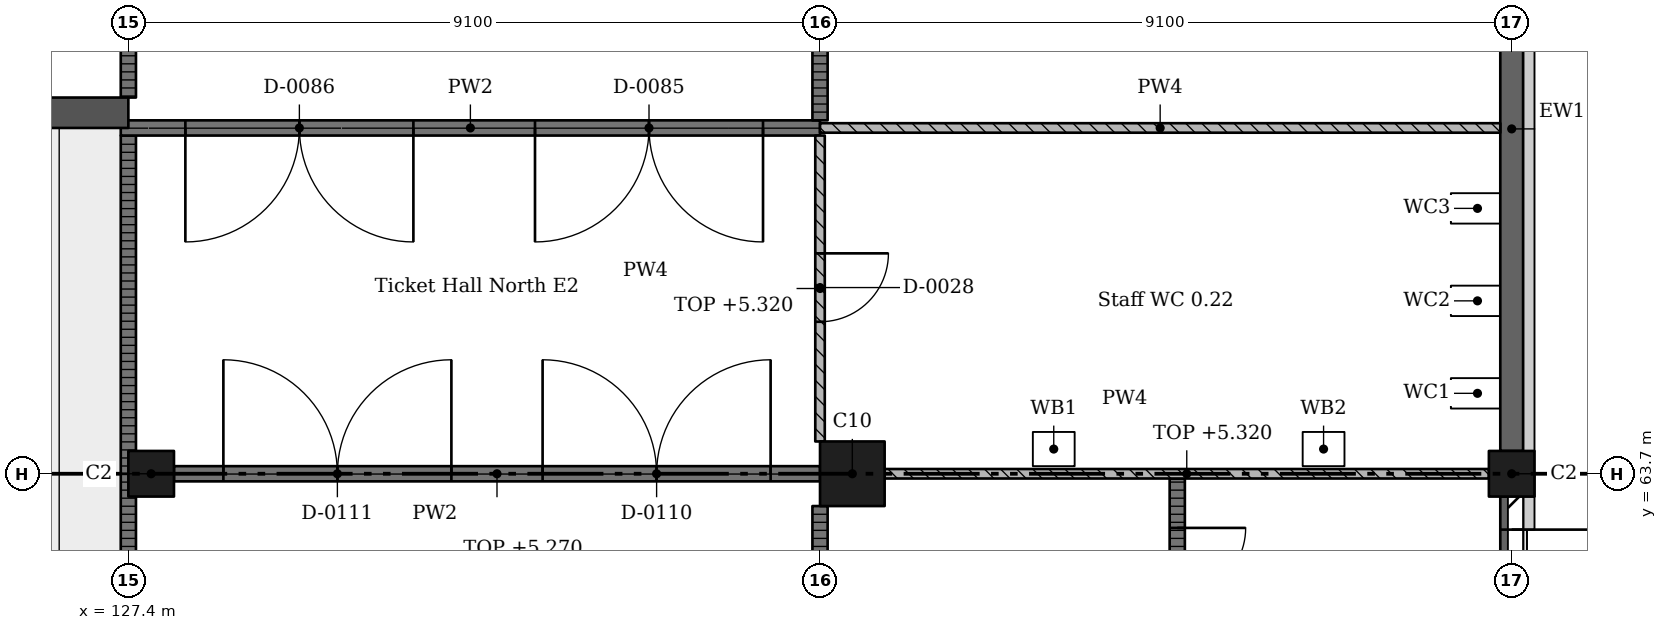
"""IFC4 building model, lengths in metres.
Left out: names, types, materials, properties, quantities, classifications, styles, units other than length and angle.
Written with IfcOpenShell. Run it as: python <this file> out.ifc"""

import sys

from ifc_helpers import new_model, si_unit, direction, frame, frame_2d, origin, origin_2d, place, context, subcontext, project, spatial, rectangle, extrude, element, fill, save


model = new_model("IFC4")
c1 = context("Model", 3, precision=1e-05, world=origin(), true_north=direction((0.0, 1.0)))
c2 = subcontext(c1, "Body", "Model", "MODEL_VIEW")
j1 = project(units=[si_unit("LENGTHUNIT", "METRE"), si_unit("PLANEANGLEUNIT", "RADIAN")], contexts=[c1])
p1 = place(None, origin())
s1 = spatial("IfcSite", under=j1, at=p1, CompositionType="ELEMENT")
p2 = place(p1, origin())
s2 = spatial("IfcBuilding", under=s1, at=p2, CompositionType="ELEMENT")
p3 = place(p2, origin())
s3 = spatial("IfcBuildingStorey", under=s2, at=p3, CompositionType="ELEMENT", Elevation=0.0)
p4 = place(p3, frame((127.7, 63.7, -0.4), z_axis=(0.0, 0.0, 1.0), x_axis=(1.0, 0.0, 0.0)))
e1 = element("IfcColumn", 1, at=p4, inside=s3, PredefinedType="COLUMN", context=c2, shape_type="SweptSolid", body=[
    extrude(rectangle(XDim=0.6, YDim=0.6, at=origin_2d()), origin(), (0.0, 0.0, 1.0), 6.77),
])
p5 = place(p3, frame((136.925, 63.7, -0.4), z_axis=(0.0, 0.0, 1.0), x_axis=(1.0, 0.0, 0.0)))
e2 = element("IfcColumn", 2, at=p5, inside=s3, PredefinedType="COLUMN", context=c2, shape_type="SweptSolid", body=[
    extrude(rectangle(XDim=0.85, YDim=0.85, at=origin_2d()), origin(), (0.0, 0.0, 1.0), 6.77),
])
p6 = place(p3, frame((145.6, 63.7, -0.4), z_axis=(0.0, 0.0, 1.0), x_axis=(1.0, 0.0, 0.0)))
e3 = element("IfcColumn", 3, at=p6, inside=s3, PredefinedType="COLUMN", context=c2, shape_type="SweptSolid", body=[
    extrude(rectangle(XDim=0.6, YDim=0.6, at=origin_2d()), origin(), (0.0, 0.0, 1.0), 6.77),
])
p7 = place(p3, frame((109.2, 68.45, -0.4), z_axis=(0.0, 0.0, 1.0), x_axis=(1.0, 0.0, 0.0)))
e4 = element("IfcWall", 4, at=p7, inside=s3, PredefinedType="SHEAR", context=c2, shape_type="SweptSolid", body=[
    extrude(rectangle(XDim=18.2, YDim=0.4, at=frame_2d((9.1, 0.0))), origin(), (0.0, 0.0, 1.0), 6.77),
])
p8 = place(p3, frame((145.6, 54.9, 0.0), z_axis=(0.0, 0.0, 1.0), x_axis=(0.0, 1.0, 0.0)))
e5 = element("IfcWall", 5, at=p8, inside=s3, PredefinedType="SOLIDWALL", context=c2, shape_type="SweptSolid", body=[
    extrude(rectangle(XDim=8.5, YDim=0.3, at=frame_2d((4.25, 0.0))), origin(), (0.0, 0.0, 1.0), 3.75),
])
p9 = place(p8, frame((0.435, 0.0, 0.0)))
e6 = element("IfcOpeningElement", 6, at=p9, cuts=e5, PredefinedType="OPENING", context=c2, shape_type="SweptSolid", body=[
    extrude(rectangle(XDim=3.6, YDim=2.7, at=frame_2d((1.8, 1.35))), frame((0.0, 0.16, 0.0), z_axis=(0.0, -1.0, 0.0), x_axis=(1.0, 0.0, 0.0)), (0.0, 0.0, 1.0), 0.32),
])
p10 = place(p8, frame((4.465, 0.0, 0.0)))
e7 = element("IfcOpeningElement", 7, at=p10, cuts=e5, PredefinedType="OPENING", context=c2, shape_type="SweptSolid", body=[
    extrude(rectangle(XDim=3.6, YDim=2.7, at=frame_2d((1.8, 1.35))), frame((0.0, 0.16, 0.0), z_axis=(0.0, -1.0, 0.0), x_axis=(1.0, 0.0, 0.0)), (0.0, 0.0, 1.0), 0.32),
])
p11 = place(p3, frame((145.6, 64.0, 0.0), z_axis=(0.0, 0.0, 1.0), x_axis=(0.0, 1.0, 0.0)))
e8 = element("IfcWall", 8, at=p11, inside=s3, PredefinedType="SOLIDWALL", context=c2, shape_type="SweptSolid", body=[
    extrude(rectangle(XDim=8.475, YDim=0.3, at=frame_2d((4.238, 0.0))), origin(), (0.0, 0.0, 1.0), 5.27),
])
p12 = place(p3, frame((127.4, 54.9, 0.0), z_axis=(0.0, 0.0, 1.0), x_axis=(0.0, 1.0, 0.0)))
e9 = element("IfcWall", 9, at=p12, inside=s3, PredefinedType="PARTITIONING", context=c2, shape_type="SweptSolid", body=[
    extrude(rectangle(XDim=8.8, YDim=0.2, at=frame_2d((4.4, 0.0))), origin(), (0.0, 0.0, 1.0), 5.02),
])
p13 = place(p3, frame((127.4, 63.7, 0.0), z_axis=(0.0, 0.0, 1.0), x_axis=(0.0, 1.0, 0.0)))
e10 = element("IfcWall", 10, at=p13, inside=s3, PredefinedType="PARTITIONING", context=c2, shape_type="SweptSolid", body=[
    extrude(rectangle(XDim=4.45, YDim=0.2, at=frame_2d((2.225, 0.0))), origin(), (0.0, 0.0, 1.0), 5.02),
])
p14 = place(p3, frame((127.4, 72.325, 0.0), z_axis=(0.0, 0.0, 1.0), x_axis=(0.0, -1.0, 0.0)))
e11 = element("IfcWall", 11, at=p14, inside=s3, PredefinedType="PARTITIONING", context=c2, shape_type="SweptSolid", body=[
    extrude(rectangle(XDim=3.675, YDim=0.2, at=frame_2d((1.837, 0.0))), origin(), (0.0, 0.0, 1.0), 5.02),
])
p15 = place(p3, frame((136.5, 63.275, 0.0), z_axis=(0.0, 0.0, 1.0), x_axis=(0.0, -1.0, 0.0)))
e12 = element("IfcWall", 12, at=p15, inside=s3, PredefinedType="PARTITIONING", context=c2, shape_type="SweptSolid", body=[
    extrude(rectangle(XDim=8.25, YDim=0.2, at=frame_2d((4.125, 0.0))), origin(), (0.0, 0.0, 1.0), 5.32),
])
p16 = place(p15, frame((1.15, 0.0, 0.0)))
e13 = element("IfcOpeningElement", 13, at=p16, cuts=e12, PredefinedType="OPENING", context=c2, shape_type="SweptSolid", body=[
    extrude(rectangle(XDim=1.8, YDim=2.4, at=frame_2d((0.9, 1.2))), frame((0.0, 0.11, 0.0), z_axis=(0.0, -1.0, 0.0), x_axis=(1.0, 0.0, 0.0)), (0.0, 0.0, 1.0), 0.22),
])
p17 = place(p15, frame((5.25, 0.0, 0.0)))
e14 = element("IfcOpeningElement", 14, at=p17, cuts=e12, PredefinedType="OPENING", context=c2, shape_type="SweptSolid", body=[
    extrude(rectangle(XDim=1.8, YDim=2.4, at=frame_2d((0.9, 1.2))), frame((0.0, 0.11, 0.0), z_axis=(0.0, -1.0, 0.0), x_axis=(1.0, 0.0, 0.0)), (0.0, 0.0, 1.0), 0.22),
])
p18 = place(p3, frame((136.5, 63.7, 0.0), z_axis=(0.0, 0.0, 1.0), x_axis=(-1.0, 0.0, 0.0)))
e15 = element("IfcWall", 15, at=p18, inside=s3, PredefinedType="PARTITIONING", context=c2, shape_type="SweptSolid", body=[
    extrude(rectangle(XDim=8.5, YDim=0.2, at=frame_2d((4.25, 0.0))), origin(), (0.0, 0.0, 1.0), 5.27),
])
p19 = place(p18, frame((0.65, 0.0, 0.0)))
e16 = element("IfcOpeningElement", 16, at=p19, cuts=e15, PredefinedType="OPENING", context=c2, shape_type="SweptSolid", body=[
    extrude(rectangle(XDim=3.0, YDim=2.4, at=frame_2d((1.5, 1.2))), frame((0.0, 0.11, 0.0), z_axis=(0.0, -1.0, 0.0), x_axis=(1.0, 0.0, 0.0)), (0.0, 0.0, 1.0), 0.22),
])
p20 = place(p18, frame((4.85, 0.0, 0.0)))
e17 = element("IfcOpeningElement", 17, at=p20, cuts=e15, PredefinedType="OPENING", context=c2, shape_type="SweptSolid", body=[
    extrude(rectangle(XDim=3.0, YDim=2.4, at=frame_2d((1.5, 1.2))), frame((0.0, 0.11, 0.0), z_axis=(0.0, -1.0, 0.0), x_axis=(1.0, 0.0, 0.0)), (0.0, 0.0, 1.0), 0.22),
])
p21 = place(p3, frame((136.5, 68.15, 0.0), z_axis=(0.0, 0.0, 1.0), x_axis=(0.0, -1.0, 0.0)))
e18 = element("IfcWall", 18, at=p21, inside=s3, PredefinedType="PARTITIONING", context=c2, shape_type="SweptSolid", body=[
    extrude(rectangle(XDim=4.025, YDim=0.125, at=frame_2d((2.012, 0.0))), origin(), (0.0, 0.0, 1.0), 5.32),
])
p22 = place(p21, frame((1.55, 0.0, 0.0)))
e19 = element("IfcOpeningElement", 19, at=p22, cuts=e18, PredefinedType="OPENING", context=c2, shape_type="SweptSolid", body=[
    extrude(rectangle(XDim=0.9, YDim=2.1, at=frame_2d((0.45, 1.05))), frame((0.0, 0.073, 0.0), z_axis=(0.0, -1.0, 0.0), x_axis=(1.0, 0.0, 0.0)), (0.0, 0.0, 1.0), 0.145),
])
p23 = place(p3, frame((136.5, 68.25, 0.0), z_axis=(0.0, 0.0, 1.0), x_axis=(-1.0, 0.0, 0.0)))
e20 = element("IfcWall", 20, at=p23, inside=s3, PredefinedType="PARTITIONING", context=c2, shape_type="SweptSolid", body=[
    extrude(rectangle(XDim=9.2, YDim=0.2, at=frame_2d((4.6, 0.0))), origin(), (0.0, 0.0, 1.0), 6.02),
])
p24 = place(p23, frame((0.75, 0.0, 0.0)))
e21 = element("IfcOpeningElement", 21, at=p24, cuts=e20, PredefinedType="OPENING", context=c2, shape_type="SweptSolid", body=[
    extrude(rectangle(XDim=3.0, YDim=2.4, at=frame_2d((1.5, 1.2))), frame((0.0, 0.11, 0.0), z_axis=(0.0, -1.0, 0.0), x_axis=(1.0, 0.0, 0.0)), (0.0, 0.0, 1.0), 0.22),
])
p25 = place(p23, frame((5.35, 0.0, 0.0)))
e22 = element("IfcOpeningElement", 22, at=p25, cuts=e20, PredefinedType="OPENING", context=c2, shape_type="SweptSolid", body=[
    extrude(rectangle(XDim=3.0, YDim=2.4, at=frame_2d((1.5, 1.2))), frame((0.0, 0.11, 0.0), z_axis=(0.0, -1.0, 0.0), x_axis=(1.0, 0.0, 0.0)), (0.0, 0.0, 1.0), 0.22),
])
p26 = place(p3, frame((136.5, 68.35, 0.0), z_axis=(0.0, 0.0, 1.0), x_axis=(0.0, 1.0, 0.0)))
e23 = element("IfcWall", 23, at=p26, inside=s3, PredefinedType="PARTITIONING", context=c2, shape_type="SweptSolid", body=[
    extrude(rectangle(XDim=4.0, YDim=0.2, at=frame_2d((2.0, 0.0))), origin(), (0.0, 0.0, 1.0), 5.32),
])
p27 = place(p3, frame((137.35, 63.7, 0.0), z_axis=(0.0, 0.0, 1.0), x_axis=(1.0, 0.0, 0.0)))
e24 = element("IfcWall", 24, at=p27, inside=s3, PredefinedType="PARTITIONING", context=c2, shape_type="SweptSolid", body=[
    extrude(rectangle(XDim=7.95, YDim=0.125, at=frame_2d((3.975, 0.0))), origin(), (0.0, 0.0, 1.0), 5.32),
])
p28 = place(p3, frame((141.2, 63.637, 0.0), z_axis=(0.0, 0.0, 1.0), x_axis=(0.0, -1.0, 0.0)))
e25 = element("IfcWall", 25, at=p28, inside=s3, PredefinedType="PARTITIONING", context=c2, shape_type="SweptSolid", body=[
    extrude(rectangle(XDim=18.012, YDim=0.2, at=frame_2d((9.006, 0.0))), origin(), (0.0, 0.0, 1.0), 6.02),
])
p29 = place(p28, frame((0.65, 0.0, 0.0)))
e26 = element("IfcOpeningElement", 26, at=p29, cuts=e25, PredefinedType="OPENING", context=c2, shape_type="SweptSolid", body=[
    extrude(rectangle(XDim=1.8, YDim=2.4, at=frame_2d((0.9, 1.2))), frame((0.0, 0.11, 0.0), z_axis=(0.0, -1.0, 0.0), x_axis=(1.0, 0.0, 0.0)), (0.0, 0.0, 1.0), 0.22),
])
p30 = place(p28, frame((3.65, 0.0, 0.0)))
e27 = element("IfcOpeningElement", 27, at=p30, cuts=e25, PredefinedType="OPENING", context=c2, shape_type="SweptSolid", body=[
    extrude(rectangle(XDim=1.8, YDim=2.4, at=frame_2d((0.9, 1.2))), frame((0.0, 0.11, 0.0), z_axis=(0.0, -1.0, 0.0), x_axis=(1.0, 0.0, 0.0)), (0.0, 0.0, 1.0), 0.22),
])
p31 = place(p28, frame((6.65, 0.0, 0.0)))
e28 = element("IfcOpeningElement", 28, at=p31, cuts=e25, PredefinedType="OPENING", context=c2, shape_type="SweptSolid", body=[
    extrude(rectangle(XDim=1.8, YDim=2.4, at=frame_2d((0.9, 1.2))), frame((0.0, 0.11, 0.0), z_axis=(0.0, -1.0, 0.0), x_axis=(1.0, 0.0, 0.0)), (0.0, 0.0, 1.0), 0.22),
])
p32 = place(p28, frame((9.65, 0.0, 0.0)))
e29 = element("IfcOpeningElement", 29, at=p32, cuts=e25, PredefinedType="OPENING", context=c2, shape_type="SweptSolid", body=[
    extrude(rectangle(XDim=1.8, YDim=2.4, at=frame_2d((0.9, 1.2))), frame((0.0, 0.11, 0.0), z_axis=(0.0, -1.0, 0.0), x_axis=(1.0, 0.0, 0.0)), (0.0, 0.0, 1.0), 0.22),
])
p33 = place(p28, frame((12.65, 0.0, 0.0)))
e30 = element("IfcOpeningElement", 30, at=p33, cuts=e25, PredefinedType="OPENING", context=c2, shape_type="SweptSolid", body=[
    extrude(rectangle(XDim=1.8, YDim=2.4, at=frame_2d((0.9, 1.2))), frame((0.0, 0.11, 0.0), z_axis=(0.0, -1.0, 0.0), x_axis=(1.0, 0.0, 0.0)), (0.0, 0.0, 1.0), 0.22),
])
p34 = place(p28, frame((15.65, 0.0, 0.0)))
e31 = element("IfcOpeningElement", 31, at=p34, cuts=e25, PredefinedType="OPENING", context=c2, shape_type="SweptSolid", body=[
    extrude(rectangle(XDim=1.8, YDim=2.4, at=frame_2d((0.9, 1.2))), frame((0.0, 0.11, 0.0), z_axis=(0.0, -1.0, 0.0), x_axis=(1.0, 0.0, 0.0)), (0.0, 0.0, 1.0), 0.22),
])
p35 = place(p3, frame((145.45, 68.25, 0.0), z_axis=(0.0, 0.0, 1.0), x_axis=(-1.0, 0.0, 0.0)))
e32 = element("IfcWall", 32, at=p35, inside=s3, PredefinedType="PARTITIONING", context=c2, shape_type="SweptSolid", body=[
    extrude(rectangle(XDim=8.95, YDim=0.125, at=frame_2d((4.475, 0.0))), origin(), (0.0, 0.0, 1.0), 6.02),
])
p36 = place(p10, frame((3.6, 0.0, 0.0), z_axis=(0.0, 0.0, 1.0), x_axis=(-1.0, 0.0, 0.0)))
e33 = element("IfcDoor", 33, at=p36, inside=s3, OperationType="DOUBLE_DOOR_SINGLE_SWING", PredefinedType="DOOR", context=c2, shape_type="SweptSolid", body=[
    extrude(rectangle(XDim=3.6, YDim=2.7, at=frame_2d((1.8, 1.35))), frame((0.0, 0.025, 0.0), z_axis=(0.0, -1.0, 0.0), x_axis=(1.0, 0.0, 0.0)), (0.0, 0.0, 1.0), 0.05),
])
fill(e7, e33)
p37 = place(p22, origin())
e34 = element("IfcDoor", 34, at=p37, inside=s3, OperationType="SINGLE_SWING_RIGHT", PredefinedType="DOOR", context=c2, shape_type="SweptSolid", body=[
    extrude(rectangle(XDim=0.9, YDim=2.1, at=frame_2d((0.45, 1.05))), frame((0.0, 0.025, 0.0), z_axis=(0.0, -1.0, 0.0), x_axis=(1.0, 0.0, 0.0)), (0.0, 0.0, 1.0), 0.05),
])
fill(e19, e34)
p38 = place(p24, origin())
e35 = element("IfcDoor", 35, at=p38, inside=s3, OperationType="DOUBLE_DOOR_SINGLE_SWING", PredefinedType="DOOR", context=c2, shape_type="SweptSolid", body=[
    extrude(rectangle(XDim=3.0, YDim=2.4, at=frame_2d((1.5, 1.2))), frame((0.0, 0.025, 0.0), z_axis=(0.0, -1.0, 0.0), x_axis=(1.0, 0.0, 0.0)), (0.0, 0.0, 1.0), 0.05),
])
fill(e21, e35)
p39 = place(p25, origin())
e36 = element("IfcDoor", 36, at=p39, inside=s3, OperationType="DOUBLE_DOOR_SINGLE_SWING", PredefinedType="DOOR", context=c2, shape_type="SweptSolid", body=[
    extrude(rectangle(XDim=3.0, YDim=2.4, at=frame_2d((1.5, 1.2))), frame((0.0, 0.025, 0.0), z_axis=(0.0, -1.0, 0.0), x_axis=(1.0, 0.0, 0.0)), (0.0, 0.0, 1.0), 0.05),
])
fill(e22, e36)
p40 = place(p19, origin())
e37 = element("IfcDoor", 37, at=p40, inside=s3, OperationType="DOUBLE_DOOR_SINGLE_SWING", PredefinedType="DOOR", context=c2, shape_type="SweptSolid", body=[
    extrude(rectangle(XDim=3.0, YDim=2.4, at=frame_2d((1.5, 1.2))), frame((0.0, 0.025, 0.0), z_axis=(0.0, -1.0, 0.0), x_axis=(1.0, 0.0, 0.0)), (0.0, 0.0, 1.0), 0.05),
])
fill(e16, e37)
p41 = place(p20, origin())
e38 = element("IfcDoor", 38, at=p41, inside=s3, OperationType="DOUBLE_DOOR_SINGLE_SWING", PredefinedType="DOOR", context=c2, shape_type="SweptSolid", body=[
    extrude(rectangle(XDim=3.0, YDim=2.4, at=frame_2d((1.5, 1.2))), frame((0.0, 0.025, 0.0), z_axis=(0.0, -1.0, 0.0), x_axis=(1.0, 0.0, 0.0)), (0.0, 0.0, 1.0), 0.05),
])
fill(e17, e38)
p42 = place(p29, origin())
e39 = element("IfcDoor", 39, at=p42, inside=s3, OperationType="DOUBLE_DOOR_SINGLE_SWING", PredefinedType="DOOR", context=c2, shape_type="SweptSolid", body=[
    extrude(rectangle(XDim=1.8, YDim=2.4, at=frame_2d((0.9, 1.2))), frame((0.0, 0.025, 0.0), z_axis=(0.0, -1.0, 0.0), x_axis=(1.0, 0.0, 0.0)), (0.0, 0.0, 1.0), 0.05),
])
fill(e26, e39)
save(model, sys.argv[1])
